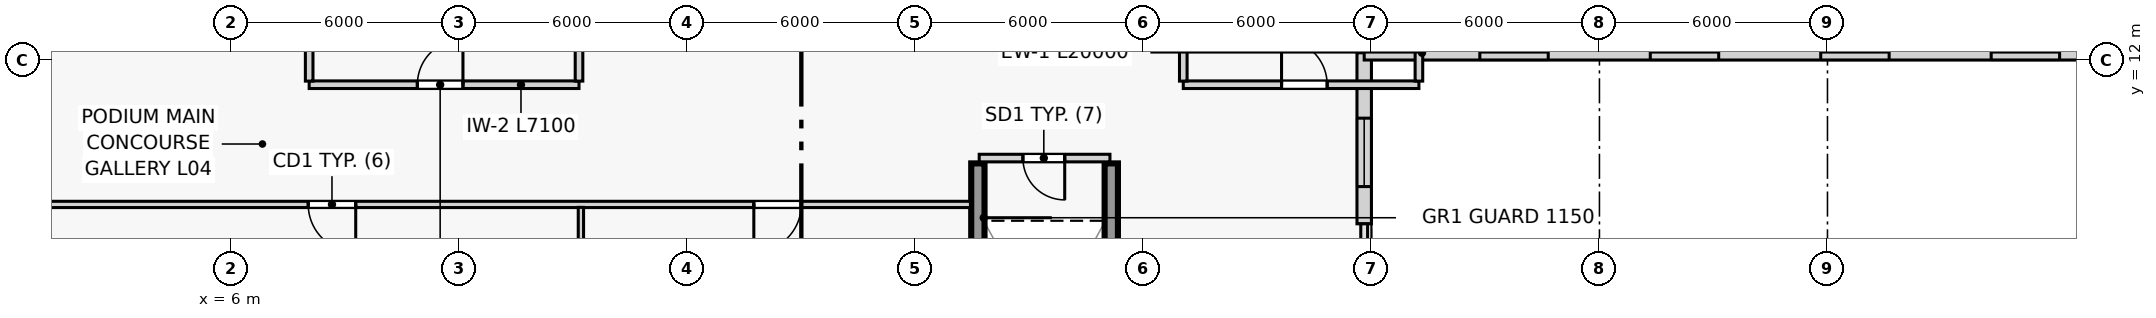
"""IFC4 building model, lengths in metres.
Left out: names, types, materials, properties, quantities, classifications, styles, units other than length and angle.
Written with IfcOpenShell. Run it as: python <this file> out.ifc"""

import sys

from ifc_helpers import new_model, si_unit, direction, frame, frame_2d, origin, place, context, subcontext, project, spatial, rectangle, extrude, source, transform, mapped, element, fill, save


model = new_model("IFC4")
c1 = context("Model", 3, precision=1e-05, world=origin(), true_north=direction((0.0, 1.0)))
c2 = subcontext(c1, "Body", "Model", "MODEL_VIEW")
j1 = project(units=[si_unit("LENGTHUNIT", "METRE"), si_unit("PLANEANGLEUNIT", "RADIAN")], contexts=[c1])
p1 = place(None, origin())
s1 = spatial("IfcSite", under=j1, at=p1, CompositionType="ELEMENT")
p2 = place(p1, origin())
s2 = spatial("IfcBuilding", under=s1, at=p2, CompositionType="ELEMENT")
p3 = place(p2, frame((0.0, 0.0, 18.0)))
s3 = spatial("IfcBuildingStorey", under=s2, at=p3, CompositionType="ELEMENT", Elevation=18.0)
for number, where, z_axis, x_axis in (
    (1, (25.645, 1.57, 0.0), (0.0, 0.0, 1.0), (0.0, 1.0, 0.0)),
    (2, (29.155, 1.57, 0.0), (0.0, 0.0, 1.0), (0.0, 1.0, 0.0)),
):
    element("IfcWall", number, at=place(p3, frame(where, z_axis=z_axis, x_axis=x_axis)), inside=s3, PredefinedType="SHEAR", context=c2, shape_type="SweptSolid", body=[
        extrude(rectangle(XDim=7.71, YDim=0.35, at=frame_2d((3.855, 0.0))), origin(), (0.0, 0.0, 1.0), 4.5),
    ])
p4 = place(p3, frame((35.81, 7.69, 0.0), z_axis=(0.0, 0.0, 1.0), x_axis=(0.0, 1.0, 0.0)))
e3 = element("IfcWall", 3, at=p4, inside=s3, PredefinedType="SOLIDWALL", context=c2, shape_type="SweptSolid", body=[
    extrude(rectangle(XDim=4.5, YDim=0.38, at=frame_2d((2.25, 0.0))), origin(), (0.0, 0.0, 1.0), 3.85),
])
p5 = place(p4, frame((0.98, 0.0, 0.8)))
e4 = element("IfcOpeningElement", 4, at=p5, cuts=e3, PredefinedType="OPENING", context=c2, shape_type="SweptSolid", body=[
    extrude(rectangle(XDim=1.8, YDim=2.1, at=frame_2d((0.9, 1.05))), frame((0.0, 0.2, 0.0), z_axis=(0.0, -1.0, 0.0), x_axis=(1.0, 0.0, 0.0)), (0.0, 0.0, 1.0), 0.4),
])
p6 = place(p3, frame((35.81, 12.19, 0.0), z_axis=(0.0, 0.0, 1.0), x_axis=(1.0, 0.0, 0.0)))
e5 = element("IfcWall", 5, at=p6, inside=s3, PredefinedType="SOLIDWALL", context=c2, shape_type="SweptSolid", body=[
    extrude(rectangle(XDim=20.0, YDim=0.38, at=frame_2d((10.0, 0.0))), origin(), (0.0, 0.0, 1.0), 3.85),
])
p7 = place(p6, frame((3.042, 0.0, 0.8)))
e6 = element("IfcOpeningElement", 6, at=p7, cuts=e5, PredefinedType="OPENING", context=c2, shape_type="SweptSolid", body=[
    extrude(rectangle(XDim=1.8, YDim=2.1, at=frame_2d((0.9, 1.05))), frame((0.0, 0.2, 0.0), z_axis=(0.0, -1.0, 0.0), x_axis=(1.0, 0.0, 0.0)), (0.0, 0.0, 1.0), 0.4),
])
p8 = place(p6, frame((7.528, 0.0, 0.8)))
e7 = element("IfcOpeningElement", 7, at=p8, cuts=e5, PredefinedType="OPENING", context=c2, shape_type="SweptSolid", body=[
    extrude(rectangle(XDim=1.8, YDim=2.1, at=frame_2d((0.9, 1.05))), frame((0.0, 0.2, 0.0), z_axis=(0.0, -1.0, 0.0), x_axis=(1.0, 0.0, 0.0)), (0.0, 0.0, 1.0), 0.4),
])
p9 = place(p6, frame((12.012, 0.0, 0.8)))
e8 = element("IfcOpeningElement", 8, at=p9, cuts=e5, PredefinedType="OPENING", context=c2, shape_type="SweptSolid", body=[
    extrude(rectangle(XDim=1.8, YDim=2.1, at=frame_2d((0.9, 1.05))), frame((0.0, 0.2, 0.0), z_axis=(0.0, -1.0, 0.0), x_axis=(1.0, 0.0, 0.0)), (0.0, 0.0, 1.0), 0.4),
])
p10 = place(p6, frame((16.498, 0.0, 0.8)))
e9 = element("IfcOpeningElement", 9, at=p10, cuts=e5, PredefinedType="OPENING", context=c2, shape_type="SweptSolid", body=[
    extrude(rectangle(XDim=1.8, YDim=2.1, at=frame_2d((0.9, 1.05))), frame((0.0, 0.2, 0.0), z_axis=(0.0, -1.0, 0.0), x_axis=(1.0, 0.0, 0.0)), (0.0, 0.0, 1.0), 0.4),
])
p11 = place(p3, frame((8.05, 11.35, 0.0), z_axis=(0.0, 0.0, 1.0), x_axis=(1.0, 0.0, 0.0)))
e10 = element("IfcWall", 10, at=p11, inside=s3, PredefinedType="PARTITIONING", context=c2, shape_type="SweptSolid", body=[
    extrude(rectangle(XDim=7.1, YDim=0.2, at=frame_2d((3.55, 0.0))), origin(), (0.0, 0.0, 1.0), 3.85),
])
p12 = place(p11, frame((2.846, 0.0, 0.0)))
e11 = element("IfcOpeningElement", 11, at=p12, cuts=e10, PredefinedType="OPENING", context=c2, shape_type="SweptSolid", body=[
    extrude(rectangle(XDim=1.2, YDim=2.2, at=frame_2d((0.6, 1.1))), frame((0.0, 0.11, 0.0), z_axis=(0.0, -1.0, 0.0), x_axis=(1.0, 0.0, 0.0)), (0.0, 0.0, 1.0), 0.22),
])
for number, where, z_axis, x_axis in (
    (12, (8.05, 11.445, 0.0), (0.0, 0.0, 1.0), (0.0, 1.0, 0.0)),
    (13, (15.15, 11.445, 0.0), (0.0, 0.0, 1.0), (0.0, 1.0, 0.0)),
):
    element("IfcWall", number, at=place(p3, frame(where, z_axis=z_axis, x_axis=x_axis)), inside=s3, PredefinedType="PARTITIONING", context=c2, shape_type="SweptSolid", body=[
        extrude(rectangle(XDim=2.985, YDim=0.2, at=frame_2d((1.492, 0.0))), origin(), (0.0, 0.0, 1.0), 3.85),
    ])
p13 = place(p3, frame((31.05, 11.35, 0.0), z_axis=(0.0, 0.0, 1.0), x_axis=(1.0, 0.0, 0.0)))
e14 = element("IfcWall", 14, at=p13, inside=s3, PredefinedType="PARTITIONING", context=c2, shape_type="SweptSolid", body=[
    extrude(rectangle(XDim=6.2, YDim=0.2, at=frame_2d((3.1, 0.0))), origin(), (0.0, 0.0, 1.0), 3.85),
])
p14 = place(p13, frame((2.586, 0.0, 0.0)))
e15 = element("IfcOpeningElement", 15, at=p14, cuts=e14, PredefinedType="OPENING", context=c2, shape_type="SweptSolid", body=[
    extrude(rectangle(XDim=1.2, YDim=2.2, at=frame_2d((0.6, 1.1))), frame((0.0, 0.11, 0.0), z_axis=(0.0, -1.0, 0.0), x_axis=(1.0, 0.0, 0.0)), (0.0, 0.0, 1.0), 0.22),
])
p15 = place(p3, frame((31.05, 11.445, 0.0), z_axis=(0.0, 0.0, 1.0), x_axis=(0.0, 1.0, 0.0)))
e16 = element("IfcWall", 16, at=p15, inside=s3, PredefinedType="PARTITIONING", context=c2, shape_type="SweptSolid", body=[
    extrude(rectangle(XDim=2.985, YDim=0.2, at=frame_2d((1.492, 0.0))), origin(), (0.0, 0.0, 1.0), 2.72),
])
p16 = place(p3, frame((37.25, 11.445, 0.0), z_axis=(0.0, 0.0, 1.0), x_axis=(0.0, 1.0, 0.0)))
e17 = element("IfcWall", 17, at=p16, inside=s3, PredefinedType="PARTITIONING", context=c2, shape_type="SweptSolid", body=[
    extrude(rectangle(XDim=2.985, YDim=0.2, at=frame_2d((1.492, 0.0))), origin(), (0.0, 0.0, 1.0), 3.85),
])
p17 = place(p3, frame((25.68, 9.42, 0.0), z_axis=(0.0, 0.0, 1.0), x_axis=(1.0, 0.0, 0.0)))
e18 = element("IfcWall", 18, at=p17, inside=s3, PredefinedType="PARTITIONING", context=c2, shape_type="SweptSolid", body=[
    extrude(rectangle(XDim=3.44, YDim=0.2, at=frame_2d((1.72, 0.0))), origin(), (0.0, 0.0, 1.0), 3.85),
])
p18 = place(p17, frame((1.15, 0.0, 0.0)))
e19 = element("IfcOpeningElement", 19, at=p18, cuts=e18, PredefinedType="OPENING", context=c2, shape_type="SweptSolid", body=[
    extrude(rectangle(XDim=1.1, YDim=2.2, at=frame_2d((0.55, 1.1))), frame((0.0, 0.11, 0.0), z_axis=(0.0, -1.0, 0.0), x_axis=(1.0, 0.0, 0.0)), (0.0, 0.0, 1.0), 0.22),
])
p19 = place(p3, frame((0.185, 8.2, 0.0), z_axis=(0.0, 0.0, 1.0), x_axis=(1.0, 0.0, 0.0)))
e20 = element("IfcWall", 20, at=p19, inside=s3, PredefinedType="PARTITIONING", context=c2, shape_type="SweptSolid", body=[
    extrude(rectangle(XDim=25.265, YDim=0.165, at=frame_2d((12.632, 0.0))), origin(), (0.0, 0.0, 1.0), 3.85),
])
p20 = place(p19, frame((7.84, 0.0, 0.0)))
e21 = element("IfcOpeningElement", 21, at=p20, cuts=e20, PredefinedType="OPENING", context=c2, shape_type="SweptSolid", body=[
    extrude(rectangle(XDim=1.25, YDim=2.2, at=frame_2d((0.625, 1.1))), frame((0.0, 0.093, 0.0), z_axis=(0.0, -1.0, 0.0), x_axis=(1.0, 0.0, 0.0)), (0.0, 0.0, 1.0), 0.185),
])
p21 = place(p19, frame((19.565, 0.0, 0.0)))
e22 = element("IfcOpeningElement", 22, at=p21, cuts=e20, PredefinedType="OPENING", context=c2, shape_type="SweptSolid", body=[
    extrude(rectangle(XDim=1.25, YDim=2.2, at=frame_2d((0.625, 1.1))), frame((0.0, 0.093, 0.0), z_axis=(0.0, -1.0, 0.0), x_axis=(1.0, 0.0, 0.0)), (0.0, 0.0, 1.0), 0.185),
])
p22 = place(p3, frame((15.2, -5.815, 0.0), z_axis=(0.0, 0.0, 1.0), x_axis=(0.0, 1.0, 0.0)))
e23 = element("IfcWall", 23, at=p22, inside=s3, PredefinedType="PARTITIONING", context=c2, shape_type="SweptSolid", body=[
    extrude(rectangle(XDim=13.938, YDim=0.14, at=frame_2d((6.969, 0.0))), origin(), (0.0, 0.0, 1.0), 3.85),
])
m1 = source(origin(), c2, "Body", "SweptSolid", [
    extrude(rectangle(XDim=1.8, YDim=2.1, at=frame_2d((0.9, 1.05))), frame((0.0, 0.03, 0.0), z_axis=(0.0, -1.0, 0.0), x_axis=(1.0, 0.0, 0.0)), (0.0, 0.0, 1.0), 0.06),
])
p23 = place(p5, origin())
e24 = element("IfcWindow", 24, at=p23, inside=s3, PartitioningType="SINGLE_PANEL", PredefinedType="WINDOW", context=c2, shape_type="MappedRepresentation", body=[
    mapped(m1, transform((0.0, 0.0, 0.0), scale=1.0)),
])
fill(e4, e24)
p24 = place(p7, origin())
e25 = element("IfcWindow", 25, at=p24, inside=s3, PartitioningType="SINGLE_PANEL", PredefinedType="WINDOW", context=c2, shape_type="MappedRepresentation", body=[
    mapped(m1, transform((0.0, 0.0, 0.0), scale=1.0)),
])
fill(e6, e25)
p25 = place(p8, origin())
e26 = element("IfcWindow", 26, at=p25, inside=s3, PartitioningType="SINGLE_PANEL", PredefinedType="WINDOW", context=c2, shape_type="MappedRepresentation", body=[
    mapped(m1, transform((0.0, 0.0, 0.0), scale=1.0)),
])
fill(e7, e26)
p26 = place(p9, origin())
e27 = element("IfcWindow", 27, at=p26, inside=s3, PartitioningType="SINGLE_PANEL", PredefinedType="WINDOW", context=c2, shape_type="MappedRepresentation", body=[
    mapped(m1, transform((0.0, 0.0, 0.0), scale=1.0)),
])
fill(e8, e27)
p27 = place(p10, origin())
e28 = element("IfcWindow", 28, at=p27, inside=s3, PartitioningType="SINGLE_PANEL", PredefinedType="WINDOW", context=c2, shape_type="MappedRepresentation", body=[
    mapped(m1, transform((0.0, 0.0, 0.0), scale=1.0)),
])
fill(e9, e28)
m2 = source(origin(), c2, "Body", "SweptSolid", [
    extrude(rectangle(XDim=1.2, YDim=2.2, at=frame_2d((0.6, 1.1))), frame((0.0, 0.025, 0.0), z_axis=(0.0, -1.0, 0.0), x_axis=(1.0, 0.0, 0.0)), (0.0, 0.0, 1.0), 0.05),
])
p28 = place(p12, origin())
e29 = element("IfcDoor", 29, at=p28, inside=s3, OperationType="SINGLE_SWING_RIGHT", PredefinedType="DOOR", context=c2, shape_type="MappedRepresentation", body=[
    mapped(m2, transform((0.0, 0.0, 0.0), scale=1.0)),
])
fill(e11, e29)
p29 = place(p14, origin())
e30 = element("IfcDoor", 30, at=p29, inside=s3, OperationType="SINGLE_SWING_LEFT", PredefinedType="DOOR", context=c2, shape_type="MappedRepresentation", body=[
    mapped(m2, transform((0.0, 0.0, 0.0), scale=1.0)),
])
fill(e15, e30)
m3 = source(origin(), c2, "Body", "SweptSolid", [
    extrude(rectangle(XDim=1.1, YDim=2.2, at=frame_2d((0.55, 1.1))), frame((0.0, 0.025, 0.0), z_axis=(0.0, -1.0, 0.0), x_axis=(1.0, 0.0, 0.0)), (0.0, 0.0, 1.0), 0.05),
])
p30 = place(p18, frame((1.1, 0.0, 0.0), z_axis=(0.0, 0.0, 1.0), x_axis=(-1.0, 0.0, 0.0)))
e31 = element("IfcDoor", 31, at=p30, inside=s3, OperationType="SINGLE_SWING_LEFT", PredefinedType="DOOR", context=c2, shape_type="MappedRepresentation", body=[
    mapped(m3, transform((0.0, 0.0, 0.0), scale=1.0)),
])
fill(e19, e31)
m4 = source(origin(), c2, "Body", "SweptSolid", [
    extrude(rectangle(XDim=1.25, YDim=2.2, at=frame_2d((0.625, 1.1))), frame((0.0, 0.025, 0.0), z_axis=(0.0, -1.0, 0.0), x_axis=(1.0, 0.0, 0.0)), (0.0, 0.0, 1.0), 0.05),
])
p31 = place(p20, frame((1.25, 0.0, 0.0), z_axis=(0.0, 0.0, 1.0), x_axis=(-1.0, 0.0, 0.0)))
e32 = element("IfcDoor", 32, at=p31, inside=s3, OperationType="SINGLE_SWING_LEFT", PredefinedType="DOOR", context=c2, shape_type="MappedRepresentation", body=[
    mapped(m4, transform((0.0, 0.0, 0.0), scale=1.0)),
])
fill(e21, e32)
p32 = place(p21, frame((1.25, 0.0, 0.0), z_axis=(0.0, 0.0, 1.0), x_axis=(-1.0, 0.0, 0.0)))
e33 = element("IfcDoor", 33, at=p32, inside=s3, OperationType="SINGLE_SWING_RIGHT", PredefinedType="DOOR", context=c2, shape_type="MappedRepresentation", body=[
    mapped(m4, transform((0.0, 0.0, 0.0), scale=1.0)),
])
fill(e22, e33)
save(model, sys.argv[1])
